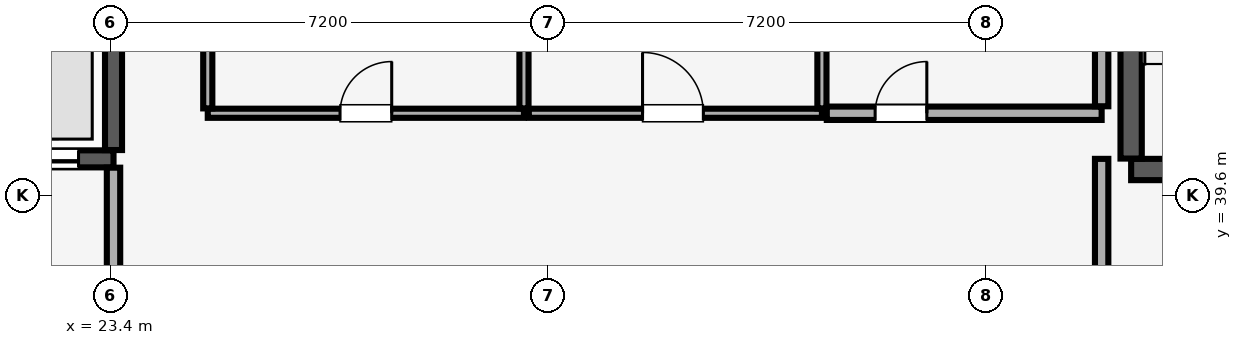
"""IFC4 building model, lengths in metres.
Left out: names, types, materials, properties, quantities, classifications, styles, units other than length and angle.
Written with IfcOpenShell. Run it as: python <this file> out.ifc"""

import sys

from ifc_helpers import new_model, si_unit, direction, frame, frame_2d, origin, place, context, subcontext, project, spatial, rectangle, extrude, element, fill, save


model = new_model("IFC4")
c1 = context("Model", 3, precision=1e-05, world=origin(), true_north=direction((0.0, 1.0)))
c2 = subcontext(c1, "Body", "Model", "MODEL_VIEW")
j1 = project(units=[si_unit("LENGTHUNIT", "METRE"), si_unit("PLANEANGLEUNIT", "RADIAN")], contexts=[c1])
p1 = place(None, origin())
s1 = spatial("IfcSite", under=j1, at=p1, CompositionType="ELEMENT")
p2 = place(p1, origin())
s2 = spatial("IfcBuilding", under=s1, at=p2, CompositionType="ELEMENT")
p3 = place(p2, frame((0.0, 0.0, -9.2)))
s3 = spatial("IfcBuildingStorey", under=s2, at=p3, CompositionType="ELEMENT", Elevation=-9.2)
p4 = place(p3, frame((40.185, 40.025, 0.0), z_axis=(0.0, 0.0, 1.0), x_axis=(1.0, 0.0, 0.0)))
e1 = element("IfcWall", 1, at=p4, inside=s3, PredefinedType="SHEAR", context=c2, shape_type="SweptSolid", body=[
    extrude(rectangle(XDim=3.63, YDim=0.35, at=frame_2d((1.815, 0.0))), origin(), (0.0, 0.0, 1.0), 4.3),
])
p5 = place(p4, frame((1.24, 0.0, 0.0)))
e2 = element("IfcOpeningElement", 2, at=p5, cuts=e1, PredefinedType="OPENING", context=c2, shape_type="SweptSolid", body=[
    extrude(rectangle(XDim=1.15, YDim=2.15, at=frame_2d((0.575, 1.075))), frame((0.0, 0.185, 0.0), z_axis=(0.0, -1.0, 0.0), x_axis=(1.0, 0.0, 0.0)), (0.0, 0.0, 1.0), 0.37),
])
p6 = place(p3, frame((40.185, 40.205, 0.0), z_axis=(0.0, 0.0, 1.0), x_axis=(0.0, 1.0, 0.0)))
e3 = element("IfcWall", 3, at=p6, inside=s3, PredefinedType="SHEAR", context=c2, shape_type="SweptSolid", body=[
    extrude(rectangle(XDim=8.09, YDim=0.35, at=frame_2d((4.045, 0.0))), origin(), (0.0, 0.0, 1.0), 4.3),
])
p7 = place(p3, frame((21.035, 40.2, 0.0), z_axis=(0.0, 0.0, 1.0), x_axis=(1.0, 0.0, 0.0)))
e4 = element("IfcWall", 4, at=p7, inside=s3, PredefinedType="SHEAR", context=c2, shape_type="SweptSolid", body=[
    extrude(rectangle(XDim=2.415, YDim=0.28, at=frame_2d((1.208, 0.0))), origin(), (0.0, 0.0, 1.0), 4.3),
])
p8 = place(p7, frame((0.54, 0.0, 0.0)))
e5 = element("IfcOpeningElement", 5, at=p8, cuts=e4, PredefinedType="OPENING", context=c2, shape_type="SweptSolid", body=[
    extrude(rectangle(XDim=1.3, YDim=2.3, at=frame_2d((0.65, 1.15))), frame((0.0, 0.15, 0.0), z_axis=(0.0, -1.0, 0.0), x_axis=(1.0, 0.0, 0.0)), (0.0, 0.0, 1.0), 0.3),
])
p9 = place(p3, frame((23.45, 40.345, 0.0), z_axis=(0.0, 0.0, 1.0), x_axis=(0.0, 1.0, 0.0)))
e6 = element("IfcWall", 6, at=p9, inside=s3, PredefinedType="SHEAR", context=c2, shape_type="SweptSolid", body=[
    extrude(rectangle(XDim=2.81, YDim=0.28, at=frame_2d((1.405, 0.0))), origin(), (0.0, 0.0, 1.0), 4.3),
])
p10 = place(p3, frame((23.45, 34.415, 0.0), z_axis=(0.0, 0.0, 1.0), x_axis=(0.0, 1.0, 0.0)))
e7 = element("IfcWall", 7, at=p10, inside=s3, PredefinedType="PARTITIONING", context=c2, shape_type="SweptSolid", body=[
    extrude(rectangle(XDim=5.64, YDim=0.22, at=frame_2d((2.82, 0.0))), origin(), (0.0, 0.0, 1.0), 4.3),
])
p11 = place(p3, frame((39.7, 34.415, 0.0), z_axis=(0.0, 0.0, 1.0), x_axis=(0.0, 1.0, 0.0)))
e8 = element("IfcWall", 8, at=p11, inside=s3, PredefinedType="PARTITIONING", context=c2, shape_type="SweptSolid", body=[
    extrude(rectangle(XDim=5.785, YDim=0.22, at=frame_2d((2.893, 0.0))), origin(), (0.0, 0.0, 1.0), 4.3),
])
p12 = place(p3, frame((25.0, 40.95, 0.0), z_axis=(0.0, 0.0, 1.0), x_axis=(1.0, 0.0, 0.0)))
e9 = element("IfcWall", 9, at=p12, inside=s3, PredefinedType="PARTITIONING", context=c2, shape_type="SweptSolid", body=[
    extrude(rectangle(XDim=5.2, YDim=0.15, at=frame_2d((2.6, 0.0))), origin(), (0.0, 0.0, 1.0), 4.3),
])
p13 = place(p12, frame((2.175, 0.0, 0.0)))
e10 = element("IfcOpeningElement", 10, at=p13, cuts=e9, PredefinedType="OPENING", context=c2, shape_type="SweptSolid", body=[
    extrude(rectangle(XDim=0.85, YDim=2.1, at=frame_2d((0.425, 1.05))), frame((0.0, 0.085, 0.0), z_axis=(0.0, -1.0, 0.0), x_axis=(1.0, 0.0, 0.0)), (0.0, 0.0, 1.0), 0.17),
])
for number, where, z_axis, x_axis in (
    (11, (25.0, 41.03, 0.0), (0.0, 0.0, 1.0), (0.0, 1.0, 0.0)),
    (12, (30.2, 41.03, 0.0), (0.0, 0.0, 1.0), (0.0, 1.0, 0.0)),
):
    element("IfcWall", number, at=place(p3, frame(where, z_axis=z_axis, x_axis=x_axis)), inside=s3, PredefinedType="PARTITIONING", context=c2, shape_type="SweptSolid", body=[
        extrude(rectangle(XDim=7.19, YDim=0.15, at=frame_2d((3.595, 0.0))), origin(), (0.0, 0.0, 1.0), 4.3),
    ])
p14 = place(p3, frame((30.28, 40.95, 0.0), z_axis=(0.0, 0.0, 1.0), x_axis=(1.0, 0.0, 0.0)))
e13 = element("IfcWall", 13, at=p14, inside=s3, PredefinedType="PARTITIONING", context=c2, shape_type="SweptSolid", body=[
    extrude(rectangle(XDim=4.82, YDim=0.15, at=frame_2d((2.41, 0.0))), origin(), (0.0, 0.0, 1.0), 4.3),
])
p15 = place(p14, frame((1.87, 0.0, 0.0)))
e14 = element("IfcOpeningElement", 14, at=p15, cuts=e13, PredefinedType="OPENING", context=c2, shape_type="SweptSolid", body=[
    extrude(rectangle(XDim=1.0, YDim=2.15, at=frame_2d((0.5, 1.075))), frame((0.0, 0.085, 0.0), z_axis=(0.0, -1.0, 0.0), x_axis=(1.0, 0.0, 0.0)), (0.0, 0.0, 1.0), 0.17),
])
p16 = place(p3, frame((35.1, 41.03, 0.0), z_axis=(0.0, 0.0, 1.0), x_axis=(0.0, 1.0, 0.0)))
e15 = element("IfcWall", 15, at=p16, inside=s3, PredefinedType="PARTITIONING", context=c2, shape_type="SweptSolid", body=[
    extrude(rectangle(XDim=7.19, YDim=0.15, at=frame_2d((3.595, 0.0))), origin(), (0.0, 0.0, 1.0), 4.3),
])
p17 = place(p3, frame((35.18, 40.95, 0.0), z_axis=(0.0, 0.0, 1.0), x_axis=(1.0, 0.0, 0.0)))
e16 = element("IfcWall", 16, at=p17, inside=s3, PredefinedType="PARTITIONING", context=c2, shape_type="SweptSolid", body=[
    extrude(rectangle(XDim=4.52, YDim=0.22, at=frame_2d((2.26, 0.0))), origin(), (0.0, 0.0, 1.0), 4.3),
])
p18 = place(p17, frame((0.795, 0.0, 0.0)))
e17 = element("IfcOpeningElement", 17, at=p18, cuts=e16, PredefinedType="OPENING", context=c2, shape_type="SweptSolid", body=[
    extrude(rectangle(XDim=0.85, YDim=2.1, at=frame_2d((0.425, 1.05))), frame((0.0, 0.12, 0.0), z_axis=(0.0, -1.0, 0.0), x_axis=(1.0, 0.0, 0.0)), (0.0, 0.0, 1.0), 0.24),
])
p19 = place(p3, frame((39.7, 41.065, 0.0), z_axis=(0.0, 0.0, 1.0), x_axis=(0.0, 1.0, 0.0)))
e18 = element("IfcWall", 18, at=p19, inside=s3, PredefinedType="PARTITIONING", context=c2, shape_type="SweptSolid", body=[
    extrude(rectangle(XDim=7.12, YDim=0.22, at=frame_2d((3.56, 0.0))), origin(), (0.0, 0.0, 1.0), 4.3),
])
p20 = place(p8, origin())
e19 = element("IfcDoor", 19, at=p20, inside=s3, OperationType="DOUBLE_DOOR_SLIDING", PredefinedType="DOOR", context=c2, shape_type="SweptSolid", body=[
    extrude(rectangle(XDim=1.3, YDim=2.3, at=frame_2d((0.65, 1.15))), frame((0.0, 0.025, 0.0), z_axis=(0.0, -1.0, 0.0), x_axis=(1.0, 0.0, 0.0)), (0.0, 0.0, 1.0), 0.05),
])
fill(e5, e19)
p21 = place(p13, origin())
e20 = element("IfcDoor", 20, at=p21, inside=s3, OperationType="SINGLE_SWING_RIGHT", PredefinedType="DOOR", context=c2, shape_type="SweptSolid", body=[
    extrude(rectangle(XDim=0.85, YDim=2.1, at=frame_2d((0.425, 1.05))), frame((0.0, 0.025, 0.0), z_axis=(0.0, -1.0, 0.0), x_axis=(1.0, 0.0, 0.0)), (0.0, 0.0, 1.0), 0.05),
])
fill(e10, e20)
p22 = place(p15, origin())
e21 = element("IfcDoor", 21, at=p22, inside=s3, OperationType="SINGLE_SWING_LEFT", PredefinedType="DOOR", context=c2, shape_type="SweptSolid", body=[
    extrude(rectangle(XDim=1.0, YDim=2.15, at=frame_2d((0.5, 1.075))), frame((0.0, 0.025, 0.0), z_axis=(0.0, -1.0, 0.0), x_axis=(1.0, 0.0, 0.0)), (0.0, 0.0, 1.0), 0.05),
])
fill(e14, e21)
p23 = place(p18, origin())
e22 = element("IfcDoor", 22, at=p23, inside=s3, OperationType="SINGLE_SWING_RIGHT", PredefinedType="DOOR", context=c2, shape_type="SweptSolid", body=[
    extrude(rectangle(XDim=0.85, YDim=2.1, at=frame_2d((0.425, 1.05))), frame((0.0, 0.025, 0.0), z_axis=(0.0, -1.0, 0.0), x_axis=(1.0, 0.0, 0.0)), (0.0, 0.0, 1.0), 0.05),
])
fill(e17, e22)
save(model, sys.argv[1])
